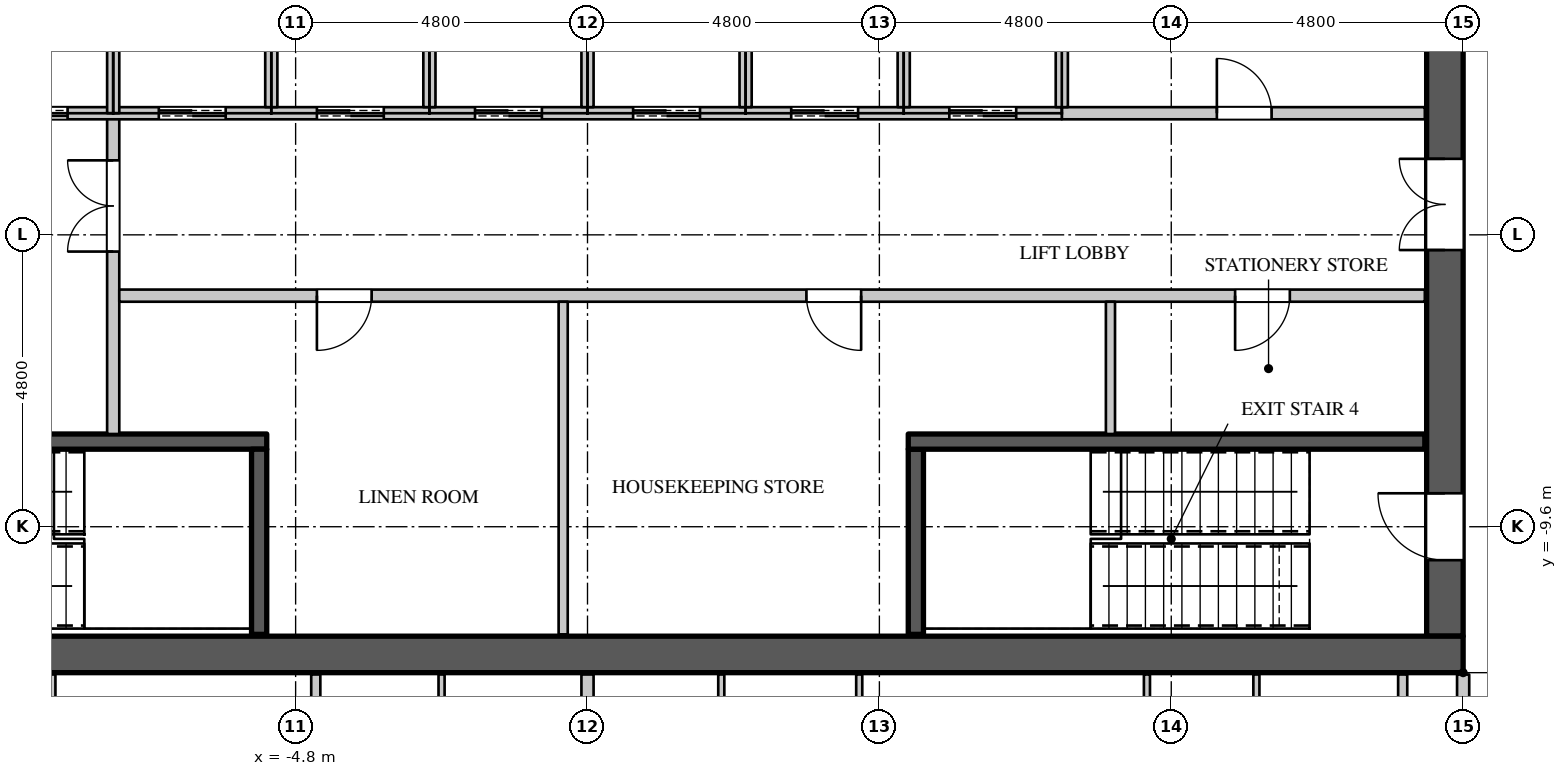
"""IFC4 building model, lengths in metres.
Left out: names, types, materials, properties, quantities, classifications, styles, units other than length and angle.
Written with IfcOpenShell. Run it as: python <this file> out.ifc"""

import sys

from ifc_helpers import new_model, si_unit, direction, frame, frame_2d, origin, place, context, subcontext, project, spatial, rectangle, extrude, element, fill, save


model = new_model("IFC4")
c1 = context("Model", 3, precision=1e-05, world=origin(), true_north=direction((0.0, 1.0)))
c2 = subcontext(c1, "Body", "Model", "MODEL_VIEW")
j1 = project(units=[si_unit("LENGTHUNIT", "METRE"), si_unit("PLANEANGLEUNIT", "RADIAN")], contexts=[c1])
p1 = place(None, origin())
s1 = spatial("IfcSite", under=j1, at=p1, CompositionType="ELEMENT")
p2 = place(p1, origin())
s2 = spatial("IfcBuilding", under=s1, at=p2, CompositionType="ELEMENT")
p3 = place(p2, frame((0.0, 0.0, 281.1)))
s3 = spatial("IfcBuildingStorey", under=s2, at=p3, CompositionType="ELEMENT", Elevation=281.1)
p4 = place(p3, frame((-14.4, -11.7, 0.0), z_axis=(0.0, 0.0, 1.0), x_axis=(1.0, 0.0, 0.0)))
e1 = element("IfcWall", 1, at=p4, inside=s3, PredefinedType="SHEAR", context=c2, shape_type="SweptSolid", body=[
    extrude(rectangle(XDim=28.8, YDim=0.6, at=frame_2d((14.4, 0.0))), origin(), (0.0, 0.0, 1.0), 4.2),
])
p5 = place(p3, frame((14.1, -11.4, 0.0), z_axis=(0.0, 0.0, 1.0), x_axis=(0.0, 1.0, 0.0)))
e2 = element("IfcWall", 2, at=p5, inside=s3, PredefinedType="SHEAR", context=c2, shape_type="SweptSolid", body=[
    extrude(rectangle(XDim=22.8, YDim=0.6, at=frame_2d((11.4, 0.0))), origin(), (0.0, 0.0, 1.0), 4.2),
])
p6 = place(p5, frame((20.45, 0.0, 0.0)))
e3 = element("IfcOpeningElement", 3, at=p6, cuts=e2, PredefinedType="OPENING", context=c2, shape_type="SweptSolid", body=[
    extrude(rectangle(XDim=1.1, YDim=2.2, at=frame_2d((0.55, 1.1))), frame((0.0, 0.31, 0.0), z_axis=(0.0, -1.0, 0.0), x_axis=(1.0, 0.0, 0.0)), (0.0, 0.0, 1.0), 0.62),
])
p7 = place(p5, frame((1.25, 0.0, 0.0)))
e4 = element("IfcOpeningElement", 4, at=p7, cuts=e2, PredefinedType="OPENING", context=c2, shape_type="SweptSolid", body=[
    extrude(rectangle(XDim=1.1, YDim=2.2, at=frame_2d((0.55, 1.1))), frame((0.0, 0.31, 0.0), z_axis=(0.0, -1.0, 0.0), x_axis=(1.0, 0.0, 0.0)), (0.0, 0.0, 1.0), 0.62),
])
p8 = place(p5, frame((14.95, 0.0, 0.0)))
e5 = element("IfcOpeningElement", 5, at=p8, cuts=e2, PredefinedType="OPENING", context=c2, shape_type="SweptSolid", body=[
    extrude(rectangle(XDim=1.5, YDim=2.4, at=frame_2d((0.75, 1.2))), frame((0.0, 0.31, 0.0), z_axis=(0.0, -1.0, 0.0), x_axis=(1.0, 0.0, 0.0)), (0.0, 0.0, 1.0), 0.62),
])
p9 = place(p5, frame((6.35, 0.0, 0.0)))
e6 = element("IfcOpeningElement", 6, at=p9, cuts=e2, PredefinedType="OPENING", context=c2, shape_type="SweptSolid", body=[
    extrude(rectangle(XDim=1.5, YDim=2.4, at=frame_2d((0.75, 1.2))), frame((0.0, 0.31, 0.0), z_axis=(0.0, -1.0, 0.0), x_axis=(1.0, 0.0, 0.0)), (0.0, 0.0, 1.0), 0.62),
])
p10 = place(p3, frame((-7.8, -8.075, 0.0), z_axis=(0.0, 0.0, 1.0), x_axis=(0.0, 1.0, 0.0)))
e7 = element("IfcWall", 7, at=p10, inside=s3, PredefinedType="PARTITIONING", context=c2, shape_type="SweptSolid", body=[
    extrude(rectangle(XDim=5.275, YDim=0.2, at=frame_2d((2.637, 0.0))), origin(), (0.0, 0.0, 1.0), 3.95),
])
p11 = place(p10, frame((3.0, 0.0, 0.0)))
e8 = element("IfcOpeningElement", 8, at=p11, cuts=e7, PredefinedType="OPENING", context=c2, shape_type="SweptSolid", body=[
    extrude(rectangle(XDim=1.5, YDim=2.4, at=frame_2d((0.75, 1.2))), frame((0.0, 0.11, 0.0), z_axis=(0.0, -1.0, 0.0), x_axis=(1.0, 0.0, 0.0)), (0.0, 0.0, 1.0), 0.22),
])
p12 = place(p3, frame((-7.7, -5.8, 0.0), z_axis=(0.0, 0.0, 1.0), x_axis=(1.0, 0.0, 0.0)))
e9 = element("IfcWall", 9, at=p12, inside=s3, PredefinedType="PARTITIONING", context=c2, shape_type="SweptSolid", body=[
    extrude(rectangle(XDim=21.47, YDim=0.2, at=frame_2d((10.735, 0.0))), origin(), (0.0, 0.0, 1.0), 3.95),
])
p13 = place(p12, frame((3.25, 0.0, 0.0)))
e10 = element("IfcOpeningElement", 10, at=p13, cuts=e9, PredefinedType="OPENING", context=c2, shape_type="SweptSolid", body=[
    extrude(rectangle(XDim=0.9, YDim=2.2, at=frame_2d((0.45, 1.1))), frame((0.0, 0.11, 0.0), z_axis=(0.0, -1.0, 0.0), x_axis=(1.0, 0.0, 0.0)), (0.0, 0.0, 1.0), 0.22),
])
p14 = place(p12, frame((11.3, 0.0, 0.0)))
e11 = element("IfcOpeningElement", 11, at=p14, cuts=e9, PredefinedType="OPENING", context=c2, shape_type="SweptSolid", body=[
    extrude(rectangle(XDim=0.9, YDim=2.2, at=frame_2d((0.45, 1.1))), frame((0.0, 0.11, 0.0), z_axis=(0.0, -1.0, 0.0), x_axis=(1.0, 0.0, 0.0)), (0.0, 0.0, 1.0), 0.22),
])
p15 = place(p12, frame((18.35, 0.0, 0.0)))
e12 = element("IfcOpeningElement", 12, at=p15, cuts=e9, PredefinedType="OPENING", context=c2, shape_type="SweptSolid", body=[
    extrude(rectangle(XDim=0.9, YDim=2.2, at=frame_2d((0.45, 1.1))), frame((0.0, 0.11, 0.0), z_axis=(0.0, -1.0, 0.0), x_axis=(1.0, 0.0, 0.0)), (0.0, 0.0, 1.0), 0.22),
])
p16 = place(p3, frame((14.4, -14.3, 0.0), z_axis=(0.0, 0.0, 1.0), x_axis=(0.0, 1.0, 0.0)))
e13 = element("IfcWall", 13, at=p16, inside=s3, PredefinedType="PARTITIONING", context=c2, shape_type="SweptSolid", body=[
    extrude(rectangle(XDim=2.27, YDim=0.2, at=frame_2d((1.135, 0.0))), origin(), (0.0, 0.0, 1.0), 3.95),
])
p17 = place(p3, frame((-4.469, -25.95, 0.0), z_axis=(0.0, 0.0, 1.0), x_axis=(0.0, 1.0, 0.0)))
e14 = element("IfcWall", 14, at=p17, inside=s3, PredefinedType="PARTITIONING", context=c2, shape_type="SweptSolid", body=[
    extrude(rectangle(XDim=13.92, YDim=0.15, at=frame_2d((6.96, 0.0))), origin(), (0.0, 0.0, 1.0), 3.3),
])
p18 = place(p17, frame((3.4, 0.0, 0.0)))
e15 = element("IfcOpeningElement", 15, at=p18, cuts=e14, PredefinedType="OPENING", context=c2, shape_type="SweptSolid", body=[
    extrude(rectangle(XDim=0.95, YDim=2.2, at=frame_2d((0.475, 1.1))), frame((0.0, 0.085, 0.0), z_axis=(0.0, -1.0, 0.0), x_axis=(1.0, 0.0, 0.0)), (0.0, 0.0, 1.0), 0.17),
])
p19 = place(p3, frame((-0.4, -11.37, 0.0), z_axis=(0.0, 0.0, 1.0), x_axis=(0.0, 1.0, 0.0)))
e16 = element("IfcWall", 16, at=p19, inside=s3, PredefinedType="PARTITIONING", context=c2, shape_type="SweptSolid", body=[
    extrude(rectangle(XDim=5.47, YDim=0.15, at=frame_2d((2.735, 0.0))), origin(), (0.0, 0.0, 1.0), 3.95),
])
p20 = place(p3, frame((8.6, -8.075, 0.0), z_axis=(0.0, 0.0, 1.0), x_axis=(0.0, 1.0, 0.0)))
e17 = element("IfcWall", 17, at=p20, inside=s3, PredefinedType="PARTITIONING", context=c2, shape_type="SweptSolid", body=[
    extrude(rectangle(XDim=2.175, YDim=0.15, at=frame_2d((1.087, 0.0))), origin(), (0.0, 0.0, 1.0), 3.95),
])
p21 = place(p3, frame((13.406, -25.731, 0.0), z_axis=(0.0, 0.0, 1.0), x_axis=(0.0, 1.0, 0.0)))
e18 = element("IfcWall", 18, at=p21, inside=s3, PredefinedType="PARTITIONING", context=c2, shape_type="SweptSolid", body=[
    extrude(rectangle(XDim=13.701, YDim=0.15, at=frame_2d((6.851, 0.0))), origin(), (0.0, 0.0, 1.0), 3.3),
])
p22 = place(p21, frame((9.7, 0.0, 0.0)))
e19 = element("IfcOpeningElement", 19, at=p22, cuts=e18, PredefinedType="OPENING", context=c2, shape_type="SweptSolid", body=[
    extrude(rectangle(XDim=1.5, YDim=2.2, at=frame_2d((0.75, 1.1))), frame((0.0, 0.085, 0.0), z_axis=(0.0, -1.0, 0.0), x_axis=(1.0, 0.0, 0.0)), (0.0, 0.0, 1.0), 0.17),
])
p23 = place(p3, frame((0.0, -26.455, 0.0), z_axis=(0.0, 0.0, 1.0), x_axis=(0.0, 1.0, 0.0)))
e20 = element("IfcWall", 20, at=p23, inside=s3, PredefinedType="PARTITIONING", context=c2, shape_type="SweptSolid", body=[
    extrude(rectangle(XDim=14.425, YDim=0.2, at=frame_2d((7.212, 0.0))), origin(), (0.0, 0.0, 1.0), 3.95),
])
p24 = place(p3, frame((7.8, -2.8, 0.0), z_axis=(0.0, 0.0, 1.0), x_axis=(1.0, 0.0, 0.0)))
e21 = element("IfcWall", 21, at=p24, inside=s3, PredefinedType="PARTITIONING", context=c2, shape_type="SweptSolid", body=[
    extrude(rectangle(XDim=5.97, YDim=0.2, at=frame_2d((2.985, 0.0))), origin(), (0.0, 0.0, 1.0), 3.95),
])
p25 = place(p24, frame((2.55, 0.0, 0.0)))
e22 = element("IfcOpeningElement", 22, at=p25, cuts=e21, PredefinedType="OPENING", context=c2, shape_type="SweptSolid", body=[
    extrude(rectangle(XDim=0.9, YDim=2.2, at=frame_2d((0.45, 1.1))), frame((0.0, 0.11, 0.0), z_axis=(0.0, -1.0, 0.0), x_axis=(1.0, 0.0, 0.0)), (0.0, 0.0, 1.0), 0.22),
])
p26 = place(p3, frame((-10.4, -2.8, 0.0), z_axis=(0.0, 0.0, 1.0), x_axis=(1.0, 0.0, 0.0)))
e23 = element("IfcWall", 23, at=p26, inside=s3, PredefinedType="PARTITIONING", context=c2, shape_type="SweptSolid", body=[
    extrude(rectangle(XDim=18.2, YDim=0.2, at=frame_2d((9.1, 0.0))), origin(), (0.0, 0.0, 1.0), 3.95),
])
p27 = place(p26, frame((0.75, 0.0, 0.0)))
e24 = element("IfcOpeningElement", 24, at=p27, cuts=e23, PredefinedType="OPENING", context=c2, shape_type="SweptSolid", body=[
    extrude(rectangle(XDim=1.1, YDim=2.2, at=frame_2d((0.55, 1.1))), frame((0.0, 0.11, 0.0), z_axis=(0.0, -1.0, 0.0), x_axis=(1.0, 0.0, 0.0)), (0.0, 0.0, 1.0), 0.22),
])
p28 = place(p26, frame((3.35, 0.0, 0.0)))
e25 = element("IfcOpeningElement", 25, at=p28, cuts=e23, PredefinedType="OPENING", context=c2, shape_type="SweptSolid", body=[
    extrude(rectangle(XDim=1.1, YDim=2.2, at=frame_2d((0.55, 1.1))), frame((0.0, 0.11, 0.0), z_axis=(0.0, -1.0, 0.0), x_axis=(1.0, 0.0, 0.0)), (0.0, 0.0, 1.0), 0.22),
])
p29 = place(p26, frame((5.95, 0.0, 0.0)))
e26 = element("IfcOpeningElement", 26, at=p29, cuts=e23, PredefinedType="OPENING", context=c2, shape_type="SweptSolid", body=[
    extrude(rectangle(XDim=1.1, YDim=2.2, at=frame_2d((0.55, 1.1))), frame((0.0, 0.11, 0.0), z_axis=(0.0, -1.0, 0.0), x_axis=(1.0, 0.0, 0.0)), (0.0, 0.0, 1.0), 0.22),
])
p30 = place(p26, frame((8.55, 0.0, 0.0)))
e27 = element("IfcOpeningElement", 27, at=p30, cuts=e23, PredefinedType="OPENING", context=c2, shape_type="SweptSolid", body=[
    extrude(rectangle(XDim=1.1, YDim=2.2, at=frame_2d((0.55, 1.1))), frame((0.0, 0.11, 0.0), z_axis=(0.0, -1.0, 0.0), x_axis=(1.0, 0.0, 0.0)), (0.0, 0.0, 1.0), 0.22),
])
p31 = place(p26, frame((11.15, 0.0, 0.0)))
e28 = element("IfcOpeningElement", 28, at=p31, cuts=e23, PredefinedType="OPENING", context=c2, shape_type="SweptSolid", body=[
    extrude(rectangle(XDim=1.1, YDim=2.2, at=frame_2d((0.55, 1.1))), frame((0.0, 0.11, 0.0), z_axis=(0.0, -1.0, 0.0), x_axis=(1.0, 0.0, 0.0)), (0.0, 0.0, 1.0), 0.22),
])
p32 = place(p26, frame((13.75, 0.0, 0.0)))
e29 = element("IfcOpeningElement", 29, at=p32, cuts=e23, PredefinedType="OPENING", context=c2, shape_type="SweptSolid", body=[
    extrude(rectangle(XDim=1.1, YDim=2.2, at=frame_2d((0.55, 1.1))), frame((0.0, 0.11, 0.0), z_axis=(0.0, -1.0, 0.0), x_axis=(1.0, 0.0, 0.0)), (0.0, 0.0, 1.0), 0.22),
])
p33 = place(p26, frame((16.35, 0.0, 0.0)))
e30 = element("IfcOpeningElement", 30, at=p33, cuts=e23, PredefinedType="OPENING", context=c2, shape_type="SweptSolid", body=[
    extrude(rectangle(XDim=1.1, YDim=2.2, at=frame_2d((0.55, 1.1))), frame((0.0, 0.11, 0.0), z_axis=(0.0, -1.0, 0.0), x_axis=(1.0, 0.0, 0.0)), (0.0, 0.0, 1.0), 0.22),
])
p34 = place(p3, frame((-7.8, -2.8, 0.0), z_axis=(0.0, 0.0, 1.0), x_axis=(0.0, 1.0, 0.0)))
e31 = element("IfcWall", 31, at=p34, inside=s3, PredefinedType="PARTITIONING", context=c2, shape_type="SweptSolid", body=[
    extrude(rectangle(XDim=2.8, YDim=0.2, at=frame_2d((1.4, 0.0))), origin(), (0.0, 0.0, 1.0), 3.95),
])
for number, where, z_axis, x_axis in (
    (32, (-5.2, -2.7, 0.0), (0.0, 0.0, 1.0), (0.0, 1.0, 0.0)),
    (33, (-2.6, -2.7, 0.0), (0.0, 0.0, 1.0), (0.0, 1.0, 0.0)),
    (34, (0.0, -2.7, 0.0), (0.0, 0.0, 1.0), (0.0, 1.0, 0.0)),
    (35, (2.6, -2.7, 0.0), (0.0, 0.0, 1.0), (0.0, 1.0, 0.0)),
    (36, (5.2, -2.7, 0.0), (0.0, 0.0, 1.0), (0.0, 1.0, 0.0)),
    (37, (7.8, -2.7, 0.0), (0.0, 0.0, 1.0), (0.0, 1.0, 0.0)),
):
    element("IfcWall", number, at=place(p3, frame(where, z_axis=z_axis, x_axis=x_axis)), inside=s3, PredefinedType="PARTITIONING", context=c2, shape_type="SweptSolid", body=[
        extrude(rectangle(XDim=2.6, YDim=0.2, at=frame_2d((1.3, 0.0))), origin(), (0.0, 0.0, 1.0), 3.95),
    ])
p35 = place(p3, frame((-13.77, -8.2, 0.0), z_axis=(0.0, 0.0, 1.0), x_axis=(1.0, 0.0, 0.0)))
e38 = element("IfcWall", 38, at=p35, inside=s3, PredefinedType="SHEAR", context=c2, shape_type="SweptSolid", body=[
    extrude(rectangle(XDim=8.495, YDim=0.25, at=frame_2d((4.248, 0.0))), origin(), (0.0, 0.0, 1.0), 3.95),
])
p36 = place(p35, frame((0.15, 0.0, 0.0)))
e39 = element("IfcOpeningElement", 39, at=p36, cuts=e38, PredefinedType="OPENING", context=c2, shape_type="SweptSolid", body=[
    extrude(rectangle(XDim=1.1, YDim=2.2, at=frame_2d((0.55, 1.1))), frame((0.0, 0.135, 0.0), z_axis=(0.0, -1.0, 0.0), x_axis=(1.0, 0.0, 0.0)), (0.0, 0.0, 1.0), 0.27),
])
for number, where, z_axis, x_axis in (
    (40, (-5.4, -11.37, 0.0), (0.0, 0.0, 1.0), (0.0, 1.0, 0.0)),
    (41, (5.4, -11.37, 0.0), (0.0, 0.0, 1.0), (0.0, 1.0, 0.0)),
):
    element("IfcWall", number, at=place(p3, frame(where, z_axis=z_axis, x_axis=x_axis)), inside=s3, PredefinedType="SHEAR", context=c2, shape_type="SweptSolid", body=[
        extrude(rectangle(XDim=3.045, YDim=0.25, at=frame_2d((1.522, 0.0))), origin(), (0.0, 0.0, 1.0), 3.95),
    ])
p37 = place(p3, frame((5.275, -8.2, 0.0), z_axis=(0.0, 0.0, 1.0), x_axis=(1.0, 0.0, 0.0)))
e42 = element("IfcWall", 42, at=p37, inside=s3, PredefinedType="SHEAR", context=c2, shape_type="SweptSolid", body=[
    extrude(rectangle(XDim=8.495, YDim=0.25, at=frame_2d((4.248, 0.0))), origin(), (0.0, 0.0, 1.0), 3.95),
])
p38 = place(p3, frame((-8.8, -18.225, 0.0), z_axis=(0.0, 0.0, 1.0), x_axis=(0.0, 1.0, 0.0)))
e43 = element("IfcWall", 43, at=p38, inside=s3, PredefinedType="PARTITIONING", context=c2, shape_type="SweptSolid", body=[
    extrude(rectangle(XDim=6.195, YDim=0.1, at=frame_2d((3.098, 0.0))), origin(), (0.0, 0.0, 1.0), 3.95),
])
p39 = place(p3, frame((-2.4, -17.725, 0.0), z_axis=(0.0, 0.0, 1.0), x_axis=(0.0, 1.0, 0.0)))
e44 = element("IfcWall", 44, at=p39, inside=s3, PredefinedType="PARTITIONING", context=c2, shape_type="SweptSolid", body=[
    extrude(rectangle(XDim=5.695, YDim=0.1, at=frame_2d((2.848, 0.0))), origin(), (0.0, 0.0, 1.0), 3.95),
])
p40 = place(p3, frame((2.2, -18.35, 0.0), z_axis=(0.0, 0.0, 1.0), x_axis=(0.0, 1.0, 0.0)))
e45 = element("IfcWall", 45, at=p40, inside=s3, PredefinedType="PARTITIONING", context=c2, shape_type="SweptSolid", body=[
    extrude(rectangle(XDim=6.32, YDim=0.1, at=frame_2d((3.16, 0.0))), origin(), (0.0, 0.0, 1.0), 3.95),
])
p41 = place(p3, frame((4.469, -18.38, 0.0), z_axis=(0.0, 0.0, 1.0), x_axis=(0.0, 1.0, 0.0)))
e46 = element("IfcWall", 46, at=p41, inside=s3, PredefinedType="PARTITIONING", context=c2, shape_type="SweptSolid", body=[
    extrude(rectangle(XDim=6.35, YDim=0.1, at=frame_2d((3.175, 0.0))), origin(), (0.0, 0.0, 1.0), 3.3),
])
p42 = place(p3, frame((9.2, -18.825, 0.0), z_axis=(0.0, 0.0, 1.0), x_axis=(0.0, 1.0, 0.0)))
e47 = element("IfcWall", 47, at=p42, inside=s3, PredefinedType="PARTITIONING", context=c2, shape_type="SweptSolid", body=[
    extrude(rectangle(XDim=6.795, YDim=0.1, at=frame_2d((3.397, 0.0))), origin(), (0.0, 0.0, 1.0), 3.95),
])
p43 = place(p3, frame((11.0, -18.825, 0.0), z_axis=(0.0, 0.0, 1.0), x_axis=(0.0, 1.0, 0.0)))
e48 = element("IfcWall", 48, at=p43, inside=s3, PredefinedType="PARTITIONING", context=c2, shape_type="SweptSolid", body=[
    extrude(rectangle(XDim=6.795, YDim=0.1, at=frame_2d((3.397, 0.0))), origin(), (0.0, 0.0, 1.0), 3.95),
])
p44 = place(p43, frame((2.95, 0.0, 0.0)))
e49 = element("IfcOpeningElement", 49, at=p44, cuts=e48, PredefinedType="OPENING", context=c2, shape_type="SweptSolid", body=[
    extrude(rectangle(XDim=0.9, YDim=2.2, at=frame_2d((0.45, 1.1))), frame((0.0, 0.06, 0.0), z_axis=(0.0, -1.0, 0.0), x_axis=(1.0, 0.0, 0.0)), (0.0, 0.0, 1.0), 0.12),
])
p45 = place(p25, origin())
e50 = element("IfcDoor", 50, at=p45, inside=s3, OperationType="SINGLE_SWING_LEFT", PredefinedType="DOOR", context=c2, shape_type="SweptSolid", body=[
    extrude(rectangle(XDim=0.9, YDim=2.2, at=frame_2d((0.45, 1.1))), frame((0.0, 0.025, 0.0), z_axis=(0.0, -1.0, 0.0), x_axis=(1.0, 0.0, 0.0)), (0.0, 0.0, 1.0), 0.05),
])
fill(e22, e50)
p46 = place(p13, origin())
e51 = element("IfcDoor", 51, at=p46, inside=s3, OperationType="SINGLE_SWING_RIGHT", PredefinedType="DOOR", context=c2, shape_type="SweptSolid", body=[
    extrude(rectangle(XDim=0.9, YDim=2.2, at=frame_2d((0.45, 1.1))), frame((0.0, 0.025, 0.0), z_axis=(0.0, -1.0, 0.0), x_axis=(1.0, 0.0, 0.0)), (0.0, 0.0, 1.0), 0.05),
])
fill(e10, e51)
p47 = place(p14, origin())
e52 = element("IfcDoor", 52, at=p47, inside=s3, OperationType="SINGLE_SWING_LEFT", PredefinedType="DOOR", context=c2, shape_type="SweptSolid", body=[
    extrude(rectangle(XDim=0.9, YDim=2.2, at=frame_2d((0.45, 1.1))), frame((0.0, 0.025, 0.0), z_axis=(0.0, -1.0, 0.0), x_axis=(1.0, 0.0, 0.0)), (0.0, 0.0, 1.0), 0.05),
])
fill(e11, e52)
p48 = place(p15, origin())
e53 = element("IfcDoor", 53, at=p48, inside=s3, OperationType="SINGLE_SWING_RIGHT", PredefinedType="DOOR", context=c2, shape_type="SweptSolid", body=[
    extrude(rectangle(XDim=0.9, YDim=2.2, at=frame_2d((0.45, 1.1))), frame((0.0, 0.025, 0.0), z_axis=(0.0, -1.0, 0.0), x_axis=(1.0, 0.0, 0.0)), (0.0, 0.0, 1.0), 0.05),
])
fill(e12, e53)
p49 = place(p27, origin())
e54 = element("IfcDoor", 54, at=p49, inside=s3, OperationType="DOUBLE_DOOR_SLIDING", PredefinedType="DOOR", context=c2, shape_type="SweptSolid", body=[
    extrude(rectangle(XDim=1.1, YDim=2.2, at=frame_2d((0.55, 1.1))), frame((0.0, 0.025, 0.0), z_axis=(0.0, -1.0, 0.0), x_axis=(1.0, 0.0, 0.0)), (0.0, 0.0, 1.0), 0.05),
])
fill(e24, e54)
p50 = place(p28, origin())
e55 = element("IfcDoor", 55, at=p50, inside=s3, OperationType="DOUBLE_DOOR_SLIDING", PredefinedType="DOOR", context=c2, shape_type="SweptSolid", body=[
    extrude(rectangle(XDim=1.1, YDim=2.2, at=frame_2d((0.55, 1.1))), frame((0.0, 0.025, 0.0), z_axis=(0.0, -1.0, 0.0), x_axis=(1.0, 0.0, 0.0)), (0.0, 0.0, 1.0), 0.05),
])
fill(e25, e55)
p51 = place(p29, origin())
e56 = element("IfcDoor", 56, at=p51, inside=s3, OperationType="DOUBLE_DOOR_SLIDING", PredefinedType="DOOR", context=c2, shape_type="SweptSolid", body=[
    extrude(rectangle(XDim=1.1, YDim=2.2, at=frame_2d((0.55, 1.1))), frame((0.0, 0.025, 0.0), z_axis=(0.0, -1.0, 0.0), x_axis=(1.0, 0.0, 0.0)), (0.0, 0.0, 1.0), 0.05),
])
fill(e26, e56)
p52 = place(p30, origin())
e57 = element("IfcDoor", 57, at=p52, inside=s3, OperationType="DOUBLE_DOOR_SLIDING", PredefinedType="DOOR", context=c2, shape_type="SweptSolid", body=[
    extrude(rectangle(XDim=1.1, YDim=2.2, at=frame_2d((0.55, 1.1))), frame((0.0, 0.025, 0.0), z_axis=(0.0, -1.0, 0.0), x_axis=(1.0, 0.0, 0.0)), (0.0, 0.0, 1.0), 0.05),
])
fill(e27, e57)
p53 = place(p31, origin())
e58 = element("IfcDoor", 58, at=p53, inside=s3, OperationType="DOUBLE_DOOR_SLIDING", PredefinedType="DOOR", context=c2, shape_type="SweptSolid", body=[
    extrude(rectangle(XDim=1.1, YDim=2.2, at=frame_2d((0.55, 1.1))), frame((0.0, 0.025, 0.0), z_axis=(0.0, -1.0, 0.0), x_axis=(1.0, 0.0, 0.0)), (0.0, 0.0, 1.0), 0.05),
])
fill(e28, e58)
p54 = place(p32, origin())
e59 = element("IfcDoor", 59, at=p54, inside=s3, OperationType="DOUBLE_DOOR_SLIDING", PredefinedType="DOOR", context=c2, shape_type="SweptSolid", body=[
    extrude(rectangle(XDim=1.1, YDim=2.2, at=frame_2d((0.55, 1.1))), frame((0.0, 0.025, 0.0), z_axis=(0.0, -1.0, 0.0), x_axis=(1.0, 0.0, 0.0)), (0.0, 0.0, 1.0), 0.05),
])
fill(e29, e59)
p55 = place(p33, origin())
e60 = element("IfcDoor", 60, at=p55, inside=s3, OperationType="DOUBLE_DOOR_SLIDING", PredefinedType="DOOR", context=c2, shape_type="SweptSolid", body=[
    extrude(rectangle(XDim=1.1, YDim=2.2, at=frame_2d((0.55, 1.1))), frame((0.0, 0.025, 0.0), z_axis=(0.0, -1.0, 0.0), x_axis=(1.0, 0.0, 0.0)), (0.0, 0.0, 1.0), 0.05),
])
fill(e30, e60)
p56 = place(p11, origin())
e61 = element("IfcDoor", 61, at=p56, inside=s3, OperationType="DOUBLE_DOOR_SINGLE_SWING", PredefinedType="DOOR", context=c2, shape_type="SweptSolid", body=[
    extrude(rectangle(XDim=1.5, YDim=2.4, at=frame_2d((0.75, 1.2))), frame((0.0, 0.025, 0.0), z_axis=(0.0, -1.0, 0.0), x_axis=(1.0, 0.0, 0.0)), (0.0, 0.0, 1.0), 0.05),
])
fill(e8, e61)
p57 = place(p7, origin())
e62 = element("IfcDoor", 62, at=p57, inside=s3, OperationType="SINGLE_SWING_RIGHT", PredefinedType="DOOR", context=c2, shape_type="SweptSolid", body=[
    extrude(rectangle(XDim=1.1, YDim=2.2, at=frame_2d((0.55, 1.1))), frame((0.0, 0.295, 0.0), z_axis=(0.0, -1.0, 0.0), x_axis=(1.0, 0.0, 0.0)), (0.0, 0.0, 1.0), 0.05),
])
fill(e4, e62)
p58 = place(p9, origin())
e63 = element("IfcDoor", 63, at=p58, inside=s3, OperationType="DOUBLE_DOOR_SINGLE_SWING", PredefinedType="DOOR", context=c2, shape_type="SweptSolid", body=[
    extrude(rectangle(XDim=1.5, YDim=2.4, at=frame_2d((0.75, 1.2))), frame((0.0, 0.295, 0.0), z_axis=(0.0, -1.0, 0.0), x_axis=(1.0, 0.0, 0.0)), (0.0, 0.0, 1.0), 0.05),
])
fill(e6, e63)
save(model, sys.argv[1])
